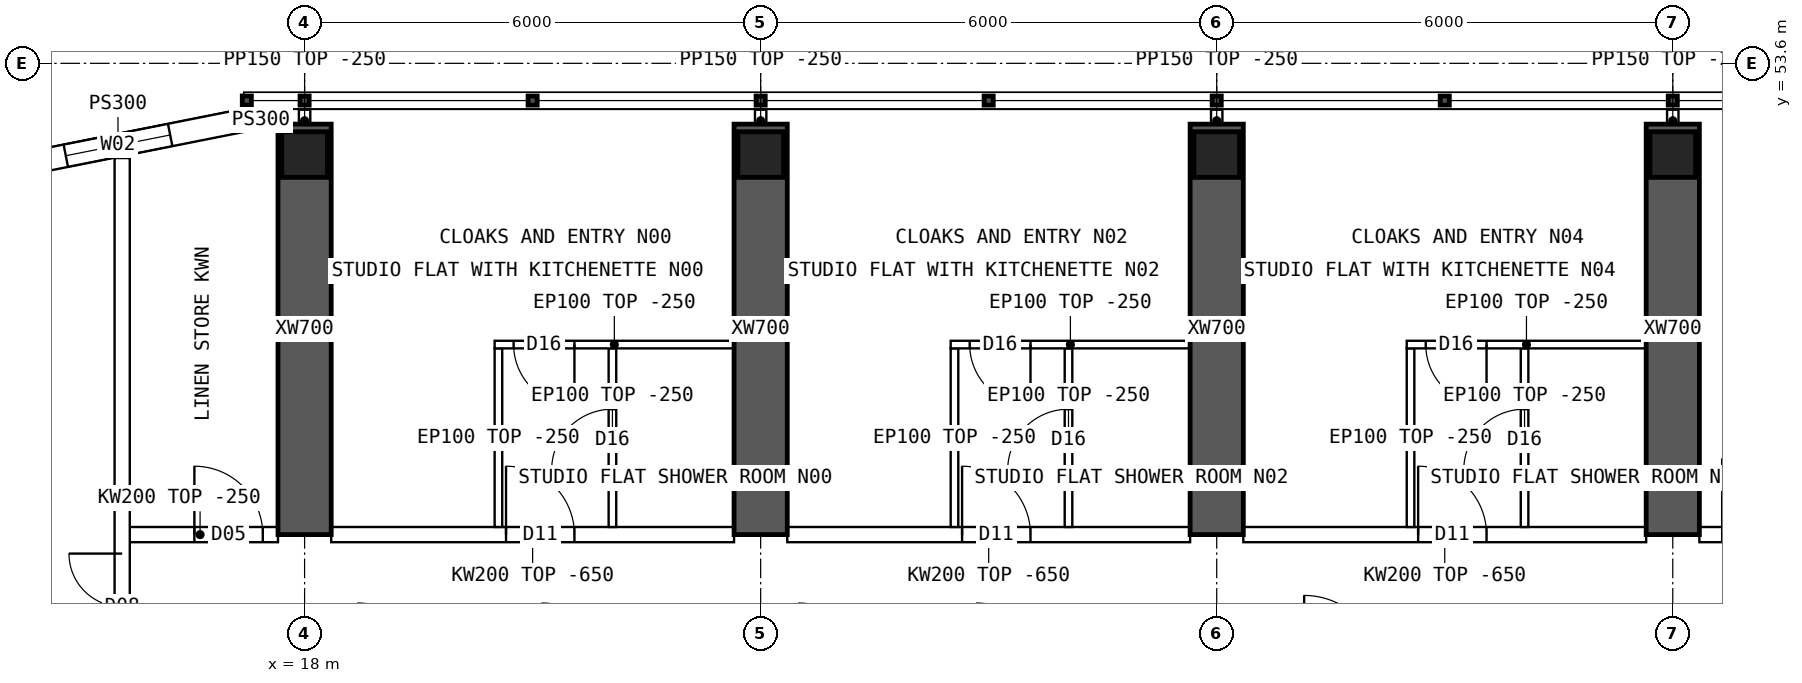
"""IFC4 building model, lengths in metres.
Left out: names, types, materials, properties, quantities, classifications, styles, units other than length and angle.
Written with IfcOpenShell. Run it as: python <this file> out.ifc"""

import sys

from ifc_helpers import new_model, si_unit, direction, frame, frame_2d, origin, origin_2d, place, context, subcontext, project, spatial, polyline, rectangle, hollow_rectangle, outline, extrude, element, fill, save


model = new_model("IFC4")
c1 = context("Model", 3, precision=1e-05, world=origin(), true_north=direction((0.0, 1.0)))
c2 = subcontext(c1, "Body", "Model", "MODEL_VIEW")
j1 = project(units=[si_unit("LENGTHUNIT", "METRE"), si_unit("PLANEANGLEUNIT", "RADIAN")], contexts=[c1])
p1 = place(None, origin())
s1 = spatial("IfcSite", under=j1, at=p1, CompositionType="ELEMENT")
p2 = place(p1, origin())
s2 = spatial("IfcBuilding", under=s1, at=p2, CompositionType="ELEMENT")
p3 = place(p2, frame((0.0, 0.0, 246.55)))
s3 = spatial("IfcBuildingStorey", under=s2, at=p3, CompositionType="ELEMENT", Elevation=246.55)
for number, where, z_axis, x_axis in (
    (1, (18.0, 52.4, 0.0), (0.0, 0.0, 1.0), (1.0, 0.0, 0.0)),
    (2, (24.0, 52.4, 0.0), (0.0, 0.0, 1.0), (1.0, 0.0, 0.0)),
    (3, (30.0, 52.4, 0.0), (0.0, 0.0, 1.0), (1.0, 0.0, 0.0)),
    (4, (36.0, 52.4, 0.0), (0.0, 0.0, 1.0), (1.0, 0.0, 0.0)),
):
    element("IfcColumn", number, at=place(p3, frame(where, z_axis=z_axis, x_axis=x_axis)), inside=s3, PredefinedType="COLUMN", context=c2, shape_type="SweptSolid", body=[
        extrude(hollow_rectangle(XDim=0.6, YDim=0.6, WallThickness=0.06, at=origin_2d()), origin(), (0.0, 0.0, 1.0), 3.75),
    ])
for number, where, z_axis, x_axis in (
    (5, (18.0, 47.4, 0.0), (0.0, 0.0, 1.0), (0.0, 1.0, 0.0)),
    (6, (24.0, 47.4, 0.0), (0.0, 0.0, 1.0), (0.0, 1.0, 0.0)),
    (7, (30.0, 47.4, 0.0), (0.0, 0.0, 1.0), (0.0, 1.0, 0.0)),
    (8, (36.0, 47.4, 0.0), (0.0, 0.0, 1.0), (0.0, 1.0, 0.0)),
):
    element("IfcWall", number, at=place(p3, frame(where, z_axis=z_axis, x_axis=x_axis)), inside=s3, PredefinedType="SHEAR", context=c2, shape_type="SweptSolid", body=[
        extrude(rectangle(XDim=5.4, YDim=0.7, at=frame_2d((2.7, 0.0))), origin(), (0.0, 0.0, 1.0), 3.75),
    ])
p4 = place(p3, frame((17.2, 52.85, 0.0), z_axis=(0.0, 0.0, 1.0), x_axis=(-0.98078325777, -0.195100490205, 0.0)))
e9 = element("IfcWall", 9, at=p4, inside=s3, PredefinedType="SOLIDWALL", context=c2, shape_type="SweptSolid", body=[
    extrude(outline(polyline([(-0.03, -0.15), (3.405, -0.15), (3.345, 0.15), (0.03, 0.15), (-0.03, -0.15)])), origin(), (0.0, 0.0, 1.0), 3.5),
])
p5 = place(p4, frame((0.988, 0.0, 0.9)))
e10 = element("IfcOpeningElement", 10, at=p5, cuts=e9, PredefinedType="OPENING", context=c2, shape_type="SweptSolid", body=[
    extrude(rectangle(XDim=1.4, YDim=1.8, at=frame_2d((0.7, 0.9))), frame((0.0, 0.16, 0.0), z_axis=(0.0, -1.0, 0.0), x_axis=(1.0, 0.0, 0.0)), (0.0, 0.0, 1.0), 0.32),
])
p6 = place(p3, frame((17.2, 52.85, 0.0), z_axis=(0.0, 0.0, 1.0), x_axis=(1.0, 0.0, 0.0)))
e11 = element("IfcWall", 11, at=p6, inside=s3, PredefinedType="SOLIDWALL", context=c2, shape_type="SweptSolid", body=[
    extrude(rectangle(XDim=0.45, YDim=0.3, at=frame_2d((0.225, 0.0))), origin(), (0.0, 0.0, 1.0), 3.5),
])
p7 = place(p3, frame((15.6, 47.4, 0.0), z_axis=(0.0, 0.0, 1.0), x_axis=(1.0, 0.0, 0.0)))
e12 = element("IfcWall", 12, at=p7, inside=s3, PredefinedType="SOLIDWALL", context=c2, shape_type="SweptSolid", body=[
    extrude(rectangle(XDim=2.05, YDim=0.2, at=frame_2d((1.025, 0.0))), origin(), (0.0, 0.0, 1.0), 3.5),
])
p8 = place(p7, frame((0.95, 0.0, 0.0)))
e13 = element("IfcOpeningElement", 13, at=p8, cuts=e12, PredefinedType="OPENING", context=c2, shape_type="SweptSolid", body=[
    extrude(rectangle(XDim=0.9, YDim=2.1, at=frame_2d((0.45, 1.05))), frame((0.0, 0.11, 0.0), z_axis=(0.0, -1.0, 0.0), x_axis=(1.0, 0.0, 0.0)), (0.0, 0.0, 1.0), 0.22),
])
p9 = place(p3, frame((18.35, 47.4, 0.0), z_axis=(0.0, 0.0, 1.0), x_axis=(1.0, 0.0, 0.0)))
e14 = element("IfcWall", 14, at=p9, inside=s3, PredefinedType="SOLIDWALL", context=c2, shape_type="SweptSolid", body=[
    extrude(outline(polyline([(0.0, 0.0), (5.3, 0.0), (5.3, 3.1), (0.0, 3.1), (0.0, 0.0)])), frame((0.0, 0.1, 0.0), z_axis=(0.0, -1.0, 0.0), x_axis=(1.0, 0.0, 0.0)), (0.0, 0.0, 1.0), 0.2),
])
p10 = place(p9, frame((2.3, 0.0, 0.0)))
e15 = element("IfcOpeningElement", 15, at=p10, cuts=e14, PredefinedType="OPENING", context=c2, shape_type="SweptSolid", body=[
    extrude(rectangle(XDim=0.9, YDim=2.1, at=frame_2d((0.45, 1.05))), frame((0.0, 0.11, 0.0), z_axis=(0.0, -1.0, 0.0), x_axis=(1.0, 0.0, 0.0)), (0.0, 0.0, 1.0), 0.22),
])
p11 = place(p3, frame((24.35, 47.4, 0.0), z_axis=(0.0, 0.0, 1.0), x_axis=(1.0, 0.0, 0.0)))
e16 = element("IfcWall", 16, at=p11, inside=s3, PredefinedType="SOLIDWALL", context=c2, shape_type="SweptSolid", body=[
    extrude(outline(polyline([(0.0, 0.0), (5.3, 0.0), (5.3, 3.1), (0.0, 3.1), (0.0, 0.0)])), frame((0.0, 0.1, 0.0), z_axis=(0.0, -1.0, 0.0), x_axis=(1.0, 0.0, 0.0)), (0.0, 0.0, 1.0), 0.2),
])
p12 = place(p11, frame((2.3, 0.0, 0.0)))
e17 = element("IfcOpeningElement", 17, at=p12, cuts=e16, PredefinedType="OPENING", context=c2, shape_type="SweptSolid", body=[
    extrude(rectangle(XDim=0.9, YDim=2.1, at=frame_2d((0.45, 1.05))), frame((0.0, 0.11, 0.0), z_axis=(0.0, -1.0, 0.0), x_axis=(1.0, 0.0, 0.0)), (0.0, 0.0, 1.0), 0.22),
])
p13 = place(p3, frame((30.35, 47.4, 0.0), z_axis=(0.0, 0.0, 1.0), x_axis=(1.0, 0.0, 0.0)))
e18 = element("IfcWall", 18, at=p13, inside=s3, PredefinedType="SOLIDWALL", context=c2, shape_type="SweptSolid", body=[
    extrude(outline(polyline([(0.0, 0.0), (5.3, 0.0), (5.3, 3.1), (0.0, 3.1), (0.0, 0.0)])), frame((0.0, 0.1, 0.0), z_axis=(0.0, -1.0, 0.0), x_axis=(1.0, 0.0, 0.0)), (0.0, 0.0, 1.0), 0.2),
])
p14 = place(p13, frame((2.3, 0.0, 0.0)))
e19 = element("IfcOpeningElement", 19, at=p14, cuts=e18, PredefinedType="OPENING", context=c2, shape_type="SweptSolid", body=[
    extrude(rectangle(XDim=0.9, YDim=2.1, at=frame_2d((0.45, 1.05))), frame((0.0, 0.11, 0.0), z_axis=(0.0, -1.0, 0.0), x_axis=(1.0, 0.0, 0.0)), (0.0, 0.0, 1.0), 0.22),
])
p15 = place(p3, frame((36.35, 47.4, 0.0), z_axis=(0.0, 0.0, 1.0), x_axis=(1.0, 0.0, 0.0)))
e20 = element("IfcWall", 20, at=p15, inside=s3, PredefinedType="SOLIDWALL", context=c2, shape_type="SweptSolid", body=[
    extrude(outline(polyline([(0.0, 0.0), (5.3, 0.0), (5.3, 3.1), (0.0, 3.1), (0.0, 0.0)])), frame((0.0, 0.1, 0.0), z_axis=(0.0, -1.0, 0.0), x_axis=(1.0, 0.0, 0.0)), (0.0, 0.0, 1.0), 0.2),
])
p16 = place(p15, frame((0.3, 0.0, 0.0)))
e21 = element("IfcOpeningElement", 21, at=p16, cuts=e20, PredefinedType="OPENING", context=c2, shape_type="SweptSolid", body=[
    extrude(rectangle(XDim=1.0, YDim=2.1, at=frame_2d((0.5, 1.05))), frame((0.0, 0.11, 0.0), z_axis=(0.0, -1.0, 0.0), x_axis=(1.0, 0.0, 0.0)), (0.0, 0.0, 1.0), 0.22),
])
p17 = place(p3, frame((20.5, 49.9, 0.0), z_axis=(0.0, 0.0, 1.0), x_axis=(1.0, 0.0, 0.0)))
e22 = element("IfcWall", 22, at=p17, inside=s3, PredefinedType="PARTITIONING", context=c2, shape_type="SweptSolid", body=[
    extrude(rectangle(XDim=3.15, YDim=0.1, at=frame_2d((1.575, 0.0))), origin(), (0.0, 0.0, 1.0), 3.5),
])
p18 = place(p17, frame((0.25, 0.0, 0.0)))
e23 = element("IfcOpeningElement", 23, at=p18, cuts=e22, PredefinedType="OPENING", context=c2, shape_type="SweptSolid", body=[
    extrude(rectangle(XDim=0.8, YDim=2.1, at=frame_2d((0.4, 1.05))), frame((0.0, 0.06, 0.0), z_axis=(0.0, -1.0, 0.0), x_axis=(1.0, 0.0, 0.0)), (0.0, 0.0, 1.0), 0.12),
])
p19 = place(p3, frame((20.55, 49.85, 0.0), z_axis=(0.0, 0.0, 1.0), x_axis=(0.0, -1.0, 0.0)))
e24 = element("IfcWall", 24, at=p19, inside=s3, PredefinedType="PARTITIONING", context=c2, shape_type="SweptSolid", body=[
    extrude(outline(polyline([(0.0, 0.0), (2.35, 0.0), (2.35, 3.1), (2.302, 3.1), (2.3, 3.5), (0.0, 3.5), (0.0, 0.0)])), frame((0.0, 0.05, 0.0), z_axis=(0.0, -1.0, 0.0), x_axis=(1.0, 0.0, 0.0)), (0.0, 0.0, 1.0), 0.1),
])
p20 = place(p3, frame((22.05, 49.85, 0.0), z_axis=(0.0, 0.0, 1.0), x_axis=(0.0, -1.0, 0.0)))
e25 = element("IfcWall", 25, at=p20, inside=s3, PredefinedType="PARTITIONING", context=c2, shape_type="SweptSolid", body=[
    extrude(outline(polyline([(0.0, 0.0), (2.35, 0.0), (2.35, 3.1), (2.302, 3.1), (2.3, 3.5), (0.0, 3.5), (0.0, 0.0)])), frame((0.0, 0.05, 0.0), z_axis=(0.0, -1.0, 0.0), x_axis=(1.0, 0.0, 0.0)), (0.0, 0.0, 1.0), 0.1),
])
p21 = place(p20, frame((0.8, 0.0, 0.0)))
e26 = element("IfcOpeningElement", 26, at=p21, cuts=e25, PredefinedType="OPENING", context=c2, shape_type="SweptSolid", body=[
    extrude(rectangle(XDim=0.8, YDim=2.1, at=frame_2d((0.4, 1.05))), frame((0.0, 0.06, 0.0), z_axis=(0.0, -1.0, 0.0), x_axis=(1.0, 0.0, 0.0)), (0.0, 0.0, 1.0), 0.12),
])
p22 = place(p3, frame((26.5, 49.9, 0.0), z_axis=(0.0, 0.0, 1.0), x_axis=(1.0, 0.0, 0.0)))
e27 = element("IfcWall", 27, at=p22, inside=s3, PredefinedType="PARTITIONING", context=c2, shape_type="SweptSolid", body=[
    extrude(rectangle(XDim=3.15, YDim=0.1, at=frame_2d((1.575, 0.0))), origin(), (0.0, 0.0, 1.0), 3.5),
])
p23 = place(p22, frame((0.25, 0.0, 0.0)))
e28 = element("IfcOpeningElement", 28, at=p23, cuts=e27, PredefinedType="OPENING", context=c2, shape_type="SweptSolid", body=[
    extrude(rectangle(XDim=0.8, YDim=2.1, at=frame_2d((0.4, 1.05))), frame((0.0, 0.06, 0.0), z_axis=(0.0, -1.0, 0.0), x_axis=(1.0, 0.0, 0.0)), (0.0, 0.0, 1.0), 0.12),
])
p24 = place(p3, frame((26.55, 49.85, 0.0), z_axis=(0.0, 0.0, 1.0), x_axis=(0.0, -1.0, 0.0)))
e29 = element("IfcWall", 29, at=p24, inside=s3, PredefinedType="PARTITIONING", context=c2, shape_type="SweptSolid", body=[
    extrude(outline(polyline([(0.0, 0.0), (2.35, 0.0), (2.35, 3.1), (2.302, 3.1), (2.3, 3.5), (0.0, 3.5), (0.0, 0.0)])), frame((0.0, 0.05, 0.0), z_axis=(0.0, -1.0, 0.0), x_axis=(1.0, 0.0, 0.0)), (0.0, 0.0, 1.0), 0.1),
])
p25 = place(p3, frame((28.05, 49.85, 0.0), z_axis=(0.0, 0.0, 1.0), x_axis=(0.0, -1.0, 0.0)))
e30 = element("IfcWall", 30, at=p25, inside=s3, PredefinedType="PARTITIONING", context=c2, shape_type="SweptSolid", body=[
    extrude(outline(polyline([(0.0, 0.0), (2.35, 0.0), (2.35, 3.1), (2.302, 3.1), (2.3, 3.5), (0.0, 3.5), (0.0, 0.0)])), frame((0.0, 0.05, 0.0), z_axis=(0.0, -1.0, 0.0), x_axis=(1.0, 0.0, 0.0)), (0.0, 0.0, 1.0), 0.1),
])
p26 = place(p25, frame((0.8, 0.0, 0.0)))
e31 = element("IfcOpeningElement", 31, at=p26, cuts=e30, PredefinedType="OPENING", context=c2, shape_type="SweptSolid", body=[
    extrude(rectangle(XDim=0.8, YDim=2.1, at=frame_2d((0.4, 1.05))), frame((0.0, 0.06, 0.0), z_axis=(0.0, -1.0, 0.0), x_axis=(1.0, 0.0, 0.0)), (0.0, 0.0, 1.0), 0.12),
])
p27 = place(p3, frame((32.5, 49.9, 0.0), z_axis=(0.0, 0.0, 1.0), x_axis=(1.0, 0.0, 0.0)))
e32 = element("IfcWall", 32, at=p27, inside=s3, PredefinedType="PARTITIONING", context=c2, shape_type="SweptSolid", body=[
    extrude(rectangle(XDim=3.15, YDim=0.1, at=frame_2d((1.575, 0.0))), origin(), (0.0, 0.0, 1.0), 3.5),
])
p28 = place(p27, frame((0.25, 0.0, 0.0)))
e33 = element("IfcOpeningElement", 33, at=p28, cuts=e32, PredefinedType="OPENING", context=c2, shape_type="SweptSolid", body=[
    extrude(rectangle(XDim=0.8, YDim=2.1, at=frame_2d((0.4, 1.05))), frame((0.0, 0.06, 0.0), z_axis=(0.0, -1.0, 0.0), x_axis=(1.0, 0.0, 0.0)), (0.0, 0.0, 1.0), 0.12),
])
p29 = place(p3, frame((32.55, 49.85, 0.0), z_axis=(0.0, 0.0, 1.0), x_axis=(0.0, -1.0, 0.0)))
e34 = element("IfcWall", 34, at=p29, inside=s3, PredefinedType="PARTITIONING", context=c2, shape_type="SweptSolid", body=[
    extrude(outline(polyline([(0.0, 0.0), (2.35, 0.0), (2.35, 3.1), (2.302, 3.1), (2.3, 3.5), (0.0, 3.5), (0.0, 0.0)])), frame((0.0, 0.05, 0.0), z_axis=(0.0, -1.0, 0.0), x_axis=(1.0, 0.0, 0.0)), (0.0, 0.0, 1.0), 0.1),
])
p30 = place(p3, frame((34.05, 49.85, 0.0), z_axis=(0.0, 0.0, 1.0), x_axis=(0.0, -1.0, 0.0)))
e35 = element("IfcWall", 35, at=p30, inside=s3, PredefinedType="PARTITIONING", context=c2, shape_type="SweptSolid", body=[
    extrude(outline(polyline([(0.0, 0.0), (2.35, 0.0), (2.35, 3.1), (2.302, 3.1), (2.3, 3.5), (0.0, 3.5), (0.0, 0.0)])), frame((0.0, 0.05, 0.0), z_axis=(0.0, -1.0, 0.0), x_axis=(1.0, 0.0, 0.0)), (0.0, 0.0, 1.0), 0.1),
])
p31 = place(p30, frame((0.8, 0.0, 0.0)))
e36 = element("IfcOpeningElement", 36, at=p31, cuts=e35, PredefinedType="OPENING", context=c2, shape_type="SweptSolid", body=[
    extrude(rectangle(XDim=0.8, YDim=2.1, at=frame_2d((0.4, 1.05))), frame((0.0, 0.06, 0.0), z_axis=(0.0, -1.0, 0.0), x_axis=(1.0, 0.0, 0.0)), (0.0, 0.0, 1.0), 0.12),
])
p32 = place(p3, frame((15.6, 11.646, 0.0), z_axis=(0.0, 0.0, 1.0), x_axis=(0.0, 1.0, 0.0)))
e37 = element("IfcWall", 37, at=p32, inside=s3, PredefinedType="SOLIDWALL", context=c2, shape_type="SweptSolid", body=[
    extrude(rectangle(XDim=40.708, YDim=0.2, at=frame_2d((20.354, 0.0))), origin(), (0.0, 0.0, 1.0), 3.5),
])
p33 = place(p32, frame((5.104, 0.0, 0.0)))
e38 = element("IfcOpeningElement", 38, at=p33, cuts=e37, PredefinedType="OPENING", context=c2, shape_type="SweptSolid", body=[
    extrude(rectangle(XDim=1.4, YDim=2.1, at=frame_2d((0.7, 1.05))), frame((0.0, 0.11, 0.0), z_axis=(0.0, -1.0, 0.0), x_axis=(1.0, 0.0, 0.0)), (0.0, 0.0, 1.0), 0.22),
])
p34 = place(p32, frame((34.104, 0.0, 0.0)))
e39 = element("IfcOpeningElement", 39, at=p34, cuts=e37, PredefinedType="OPENING", context=c2, shape_type="SweptSolid", body=[
    extrude(rectangle(XDim=1.4, YDim=2.1, at=frame_2d((0.7, 1.05))), frame((0.0, 0.11, 0.0), z_axis=(0.0, -1.0, 0.0), x_axis=(1.0, 0.0, 0.0)), (0.0, 0.0, 1.0), 0.22),
])
for number, where, z_axis, x_axis in (
    (40, (18.0, 52.7, 0.0), (0.0, 0.0, 1.0), (0.0, 1.0, 0.0)),
    (41, (24.0, 52.7, 0.0), (0.0, 0.0, 1.0), (0.0, 1.0, 0.0)),
    (42, (30.0, 52.7, 0.0), (0.0, 0.0, 1.0), (0.0, 1.0, 0.0)),
    (43, (36.0, 52.7, 0.0), (0.0, 0.0, 1.0), (0.0, 1.0, 0.0)),
):
    element("IfcWall", number, at=place(p3, frame(where, z_axis=z_axis, x_axis=x_axis)), inside=s3, PredefinedType="PARTITIONING", context=c2, shape_type="SweptSolid", body=[
        extrude(rectangle(XDim=0.29, YDim=0.15, at=frame_2d((0.145, 0.0))), origin(), (0.0, 0.0, 1.0), 3.5),
    ])
p35 = place(p5, origin())
e44 = element("IfcWindow", 44, at=p35, inside=s3, PartitioningType="SINGLE_PANEL", PredefinedType="WINDOW", context=c2, shape_type="SweptSolid", body=[
    extrude(rectangle(XDim=1.4, YDim=1.8, at=frame_2d((0.7, 0.9))), frame((0.0, 0.03, 0.0), z_axis=(0.0, -1.0, 0.0), x_axis=(1.0, 0.0, 0.0)), (0.0, 0.0, 1.0), 0.06),
])
fill(e10, e44)
p36 = place(p18, origin())
e45 = element("IfcDoor", 45, at=p36, inside=s3, OperationType="SINGLE_SWING_RIGHT", PredefinedType="DOOR", context=c2, shape_type="SweptSolid", body=[
    extrude(rectangle(XDim=0.8, YDim=2.1, at=frame_2d((0.4, 1.05))), frame((0.0, 0.025, 0.0), z_axis=(0.0, -1.0, 0.0), x_axis=(1.0, 0.0, 0.0)), (0.0, 0.0, 1.0), 0.05),
])
fill(e23, e45)
p37 = place(p21, origin())
e46 = element("IfcDoor", 46, at=p37, inside=s3, OperationType="SINGLE_SWING_RIGHT", PredefinedType="DOOR", context=c2, shape_type="SweptSolid", body=[
    extrude(rectangle(XDim=0.8, YDim=2.1, at=frame_2d((0.4, 1.05))), frame((0.0, 0.025, 0.0), z_axis=(0.0, -1.0, 0.0), x_axis=(1.0, 0.0, 0.0)), (0.0, 0.0, 1.0), 0.05),
])
fill(e26, e46)
p38 = place(p10, origin())
e47 = element("IfcDoor", 47, at=p38, inside=s3, OperationType="SINGLE_SWING_LEFT", PredefinedType="DOOR", context=c2, shape_type="SweptSolid", body=[
    extrude(rectangle(XDim=0.9, YDim=2.1, at=frame_2d((0.45, 1.05))), frame((0.0, 0.025, 0.0), z_axis=(0.0, -1.0, 0.0), x_axis=(1.0, 0.0, 0.0)), (0.0, 0.0, 1.0), 0.05),
])
fill(e15, e47)
p39 = place(p23, origin())
e48 = element("IfcDoor", 48, at=p39, inside=s3, OperationType="SINGLE_SWING_RIGHT", PredefinedType="DOOR", context=c2, shape_type="SweptSolid", body=[
    extrude(rectangle(XDim=0.8, YDim=2.1, at=frame_2d((0.4, 1.05))), frame((0.0, 0.025, 0.0), z_axis=(0.0, -1.0, 0.0), x_axis=(1.0, 0.0, 0.0)), (0.0, 0.0, 1.0), 0.05),
])
fill(e28, e48)
p40 = place(p26, origin())
e49 = element("IfcDoor", 49, at=p40, inside=s3, OperationType="SINGLE_SWING_RIGHT", PredefinedType="DOOR", context=c2, shape_type="SweptSolid", body=[
    extrude(rectangle(XDim=0.8, YDim=2.1, at=frame_2d((0.4, 1.05))), frame((0.0, 0.025, 0.0), z_axis=(0.0, -1.0, 0.0), x_axis=(1.0, 0.0, 0.0)), (0.0, 0.0, 1.0), 0.05),
])
fill(e31, e49)
p41 = place(p12, origin())
e50 = element("IfcDoor", 50, at=p41, inside=s3, OperationType="SINGLE_SWING_LEFT", PredefinedType="DOOR", context=c2, shape_type="SweptSolid", body=[
    extrude(rectangle(XDim=0.9, YDim=2.1, at=frame_2d((0.45, 1.05))), frame((0.0, 0.025, 0.0), z_axis=(0.0, -1.0, 0.0), x_axis=(1.0, 0.0, 0.0)), (0.0, 0.0, 1.0), 0.05),
])
fill(e17, e50)
p42 = place(p28, origin())
e51 = element("IfcDoor", 51, at=p42, inside=s3, OperationType="SINGLE_SWING_RIGHT", PredefinedType="DOOR", context=c2, shape_type="SweptSolid", body=[
    extrude(rectangle(XDim=0.8, YDim=2.1, at=frame_2d((0.4, 1.05))), frame((0.0, 0.025, 0.0), z_axis=(0.0, -1.0, 0.0), x_axis=(1.0, 0.0, 0.0)), (0.0, 0.0, 1.0), 0.05),
])
fill(e33, e51)
p43 = place(p31, origin())
e52 = element("IfcDoor", 52, at=p43, inside=s3, OperationType="SINGLE_SWING_RIGHT", PredefinedType="DOOR", context=c2, shape_type="SweptSolid", body=[
    extrude(rectangle(XDim=0.8, YDim=2.1, at=frame_2d((0.4, 1.05))), frame((0.0, 0.025, 0.0), z_axis=(0.0, -1.0, 0.0), x_axis=(1.0, 0.0, 0.0)), (0.0, 0.0, 1.0), 0.05),
])
fill(e36, e52)
p44 = place(p14, origin())
e53 = element("IfcDoor", 53, at=p44, inside=s3, OperationType="SINGLE_SWING_LEFT", PredefinedType="DOOR", context=c2, shape_type="SweptSolid", body=[
    extrude(rectangle(XDim=0.9, YDim=2.1, at=frame_2d((0.45, 1.05))), frame((0.0, 0.025, 0.0), z_axis=(0.0, -1.0, 0.0), x_axis=(1.0, 0.0, 0.0)), (0.0, 0.0, 1.0), 0.05),
])
fill(e19, e53)
p45 = place(p34, origin())
e54 = element("IfcDoor", 54, at=p45, inside=s3, OperationType="DOUBLE_DOOR_SINGLE_SWING", PredefinedType="DOOR", context=c2, shape_type="SweptSolid", body=[
    extrude(rectangle(XDim=1.4, YDim=2.1, at=frame_2d((0.7, 1.05))), frame((0.0, 0.025, 0.0), z_axis=(0.0, -1.0, 0.0), x_axis=(1.0, 0.0, 0.0)), (0.0, 0.0, 1.0), 0.05),
])
fill(e39, e54)
p46 = place(p8, origin())
e55 = element("IfcDoor", 55, at=p46, inside=s3, OperationType="SINGLE_SWING_LEFT", PredefinedType="DOOR", context=c2, shape_type="SweptSolid", body=[
    extrude(rectangle(XDim=0.9, YDim=2.1, at=frame_2d((0.45, 1.05))), frame((0.0, 0.025, 0.0), z_axis=(0.0, -1.0, 0.0), x_axis=(1.0, 0.0, 0.0)), (0.0, 0.0, 1.0), 0.05),
])
fill(e13, e55)
save(model, sys.argv[1])
